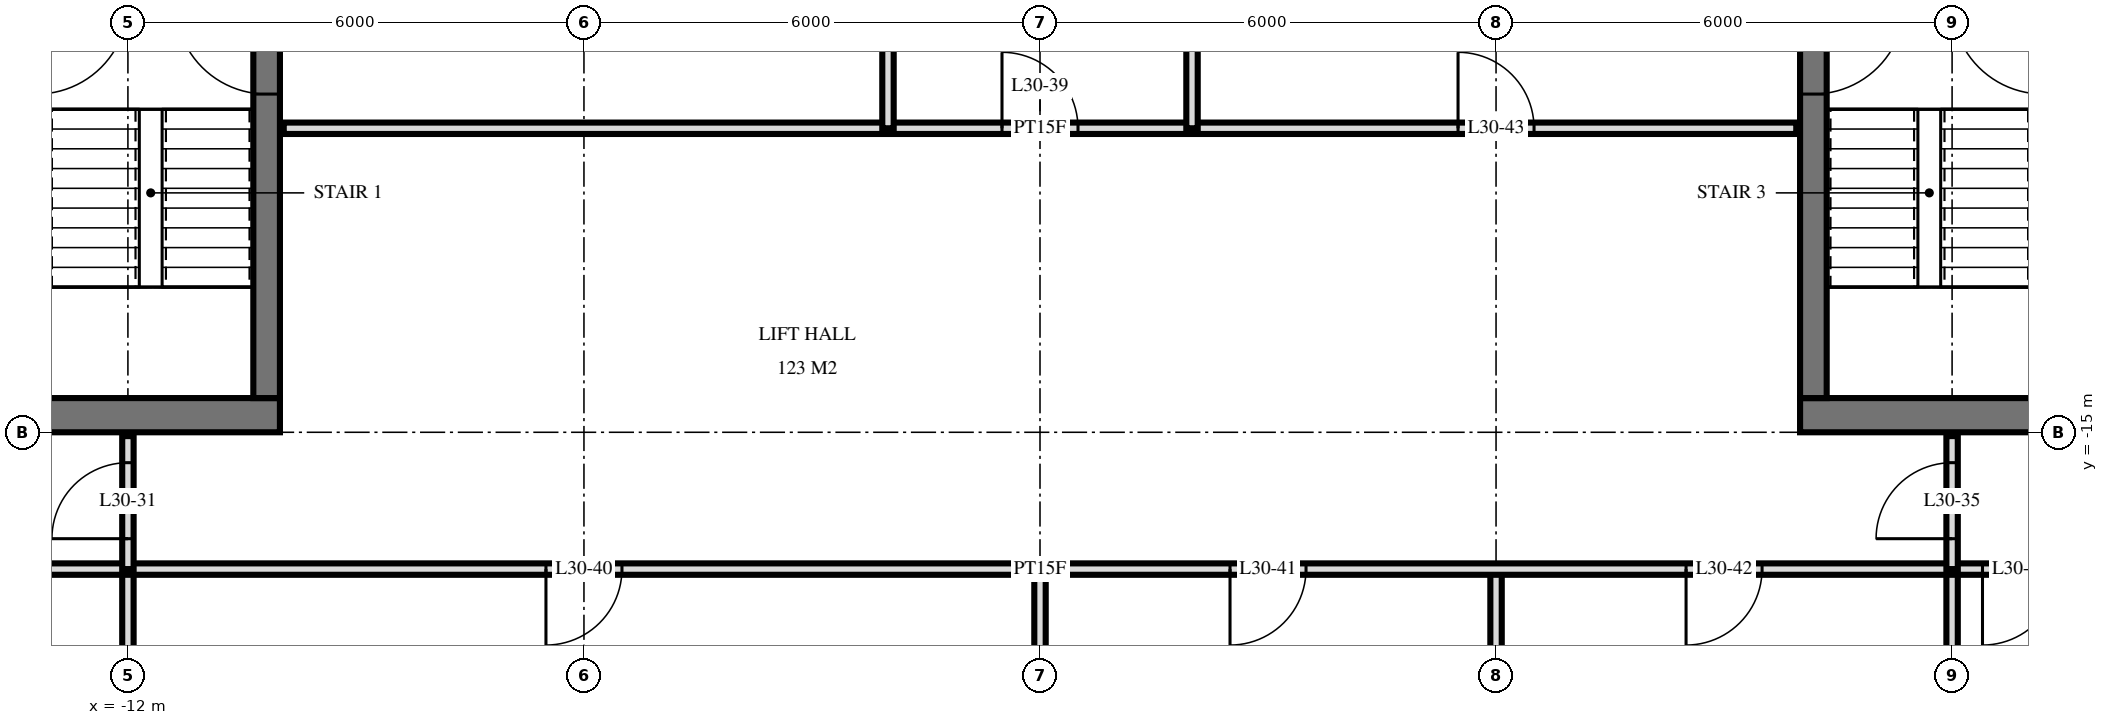
"""IFC4 building model, lengths in metres.
Left out: names, types, materials, properties, quantities, classifications, styles, units other than length and angle.
Written with IfcOpenShell. Run it as: python <this file> out.ifc"""

import sys

from ifc_helpers import new_model, si_unit, direction, frame, frame_2d, origin, place, context, subcontext, project, spatial, rectangle, extrude, element, fill, save


model = new_model("IFC4")
c1 = context("Model", 3, precision=1e-05, world=origin(), true_north=direction((0.0, 1.0)))
c2 = subcontext(c1, "Body", "Model", "MODEL_VIEW")
j1 = project(units=[si_unit("LENGTHUNIT", "METRE"), si_unit("PLANEANGLEUNIT", "RADIAN")], contexts=[c1])
p1 = place(None, origin())
s1 = spatial("IfcSite", under=j1, at=p1, CompositionType="ELEMENT")
p2 = place(p1, origin())
s2 = spatial("IfcBuilding", under=s1, at=p2, CompositionType="ELEMENT")
p3 = place(p2, frame((0.0, 0.0, 120.0)))
s3 = spatial("IfcBuildingStorey", under=s2, at=p3, CompositionType="ELEMENT", Elevation=120.0)
p4 = place(p3, frame((-24.5, -14.775, 0.0), z_axis=(0.0, 0.0, 1.0), x_axis=(1.0, 0.0, 0.0)))
e1 = element("IfcWall", 1, at=p4, inside=s3, PredefinedType="SHEAR", context=c2, shape_type="SweptSolid", body=[
    extrude(rectangle(XDim=14.5, YDim=0.45, at=frame_2d((7.25, 0.0))), origin(), (0.0, 0.0, 1.0), 3.6),
])
p5 = place(p4, frame((6.2, 0.0, 0.0)))
e2 = element("IfcOpeningElement", 2, at=p5, cuts=e1, PredefinedType="OPENING", context=c2, shape_type="SweptSolid", body=[
    extrude(rectangle(XDim=1.2, YDim=2.1, at=frame_2d((0.6, 1.05))), frame((0.0, 0.235, 0.0), z_axis=(0.0, -1.0, 0.0), x_axis=(1.0, 0.0, 0.0)), (0.0, 0.0, 1.0), 0.47),
])
p6 = place(p4, frame((9.25, 0.0, 0.0)))
e3 = element("IfcOpeningElement", 3, at=p6, cuts=e1, PredefinedType="OPENING", context=c2, shape_type="SweptSolid", body=[
    extrude(rectangle(XDim=1.1, YDim=2.1, at=frame_2d((0.55, 1.05))), frame((0.0, 0.235, 0.0), z_axis=(0.0, -1.0, 0.0), x_axis=(1.0, 0.0, 0.0)), (0.0, 0.0, 1.0), 0.47),
])
p7 = place(p4, frame((3.5, 0.0, 0.0)))
e4 = element("IfcOpeningElement", 4, at=p7, cuts=e1, PredefinedType="OPENING", context=c2, shape_type="SweptSolid", body=[
    extrude(rectangle(XDim=0.9, YDim=2.1, at=frame_2d((0.45, 1.05))), frame((0.0, 0.235, 0.0), z_axis=(0.0, -1.0, 0.0), x_axis=(1.0, 0.0, 0.0)), (0.0, 0.0, 1.0), 0.47),
])
p8 = place(p4, frame((1.05, 0.0, 0.0)))
e5 = element("IfcOpeningElement", 5, at=p8, cuts=e1, PredefinedType="OPENING", context=c2, shape_type="SweptSolid", body=[
    extrude(rectangle(XDim=1.0, YDim=2.1, at=frame_2d((0.5, 1.05))), frame((0.0, 0.235, 0.0), z_axis=(0.0, -1.0, 0.0), x_axis=(1.0, 0.0, 0.0)), (0.0, 0.0, 1.0), 0.47),
])
p9 = place(p3, frame((-10.175, -14.55, 0.0), z_axis=(0.0, 0.0, 1.0), x_axis=(0.0, 1.0, 0.0)))
e6 = element("IfcWall", 6, at=p9, inside=s3, PredefinedType="SHEAR", context=c2, shape_type="SweptSolid", body=[
    extrude(rectangle(XDim=14.1, YDim=0.35, at=frame_2d((7.05, 0.0))), origin(), (0.0, 0.0, 1.0), 3.6),
])
p10 = place(p9, frame((8.4, 0.0, 0.0)))
e7 = element("IfcOpeningElement", 7, at=p10, cuts=e6, PredefinedType="OPENING", context=c2, shape_type="SweptSolid", body=[
    extrude(rectangle(XDim=1.4, YDim=2.4, at=frame_2d((0.7, 1.2))), frame((0.0, 0.185, 0.0), z_axis=(0.0, -1.0, 0.0), x_axis=(1.0, 0.0, 0.0)), (0.0, 0.0, 1.0), 0.37),
])
p11 = place(p9, frame((10.0, 0.0, 0.0)))
e8 = element("IfcOpeningElement", 8, at=p11, cuts=e6, PredefinedType="OPENING", context=c2, shape_type="SweptSolid", body=[
    extrude(rectangle(XDim=1.4, YDim=2.4, at=frame_2d((0.7, 1.2))), frame((0.0, 0.185, 0.0), z_axis=(0.0, -1.0, 0.0), x_axis=(1.0, 0.0, 0.0)), (0.0, 0.0, 1.0), 0.37),
])
p12 = place(p9, frame((4.0, 0.0, 0.0)))
e9 = element("IfcOpeningElement", 9, at=p12, cuts=e6, PredefinedType="OPENING", context=c2, shape_type="SweptSolid", body=[
    extrude(rectangle(XDim=1.2, YDim=2.1, at=frame_2d((0.6, 1.05))), frame((0.0, 0.185, 0.0), z_axis=(0.0, -1.0, 0.0), x_axis=(1.0, 0.0, 0.0)), (0.0, 0.0, 1.0), 0.37),
])
p13 = place(p3, frame((10.0, -14.775, 0.0), z_axis=(0.0, 0.0, 1.0), x_axis=(1.0, 0.0, 0.0)))
e10 = element("IfcWall", 10, at=p13, inside=s3, PredefinedType="SHEAR", context=c2, shape_type="SweptSolid", body=[
    extrude(rectangle(XDim=14.5, YDim=0.45, at=frame_2d((7.25, 0.0))), origin(), (0.0, 0.0, 1.0), 3.6),
])
p14 = place(p13, frame((7.1, 0.0, 0.0)))
e11 = element("IfcOpeningElement", 11, at=p14, cuts=e10, PredefinedType="OPENING", context=c2, shape_type="SweptSolid", body=[
    extrude(rectangle(XDim=1.2, YDim=2.1, at=frame_2d((0.6, 1.05))), frame((0.0, 0.235, 0.0), z_axis=(0.0, -1.0, 0.0), x_axis=(1.0, 0.0, 0.0)), (0.0, 0.0, 1.0), 0.47),
])
p15 = place(p13, frame((4.15, 0.0, 0.0)))
e12 = element("IfcOpeningElement", 12, at=p15, cuts=e10, PredefinedType="OPENING", context=c2, shape_type="SweptSolid", body=[
    extrude(rectangle(XDim=1.1, YDim=2.1, at=frame_2d((0.55, 1.05))), frame((0.0, 0.235, 0.0), z_axis=(0.0, -1.0, 0.0), x_axis=(1.0, 0.0, 0.0)), (0.0, 0.0, 1.0), 0.47),
])
p16 = place(p13, frame((10.1, 0.0, 0.0)))
e13 = element("IfcOpeningElement", 13, at=p16, cuts=e10, PredefinedType="OPENING", context=c2, shape_type="SweptSolid", body=[
    extrude(rectangle(XDim=0.9, YDim=2.1, at=frame_2d((0.45, 1.05))), frame((0.0, 0.235, 0.0), z_axis=(0.0, -1.0, 0.0), x_axis=(1.0, 0.0, 0.0)), (0.0, 0.0, 1.0), 0.47),
])
p17 = place(p13, frame((12.45, 0.0, 0.0)))
e14 = element("IfcOpeningElement", 14, at=p17, cuts=e10, PredefinedType="OPENING", context=c2, shape_type="SweptSolid", body=[
    extrude(rectangle(XDim=1.0, YDim=2.1, at=frame_2d((0.5, 1.05))), frame((0.0, 0.235, 0.0), z_axis=(0.0, -1.0, 0.0), x_axis=(1.0, 0.0, 0.0)), (0.0, 0.0, 1.0), 0.47),
])
p18 = place(p3, frame((10.175, -14.55, 0.0), z_axis=(0.0, 0.0, 1.0), x_axis=(0.0, 1.0, 0.0)))
e15 = element("IfcWall", 15, at=p18, inside=s3, PredefinedType="SHEAR", context=c2, shape_type="SweptSolid", body=[
    extrude(rectangle(XDim=14.1, YDim=0.35, at=frame_2d((7.05, 0.0))), origin(), (0.0, 0.0, 1.0), 3.6),
])
p19 = place(p18, frame((8.4, 0.0, 0.0)))
e16 = element("IfcOpeningElement", 16, at=p19, cuts=e15, PredefinedType="OPENING", context=c2, shape_type="SweptSolid", body=[
    extrude(rectangle(XDim=1.4, YDim=2.4, at=frame_2d((0.7, 1.2))), frame((0.0, 0.185, 0.0), z_axis=(0.0, -1.0, 0.0), x_axis=(1.0, 0.0, 0.0)), (0.0, 0.0, 1.0), 0.37),
])
p20 = place(p18, frame((10.0, 0.0, 0.0)))
e17 = element("IfcOpeningElement", 17, at=p20, cuts=e15, PredefinedType="OPENING", context=c2, shape_type="SweptSolid", body=[
    extrude(rectangle(XDim=1.4, YDim=2.4, at=frame_2d((0.7, 1.2))), frame((0.0, 0.185, 0.0), z_axis=(0.0, -1.0, 0.0), x_axis=(1.0, 0.0, 0.0)), (0.0, 0.0, 1.0), 0.37),
])
p21 = place(p18, frame((4.0, 0.0, 0.0)))
e18 = element("IfcOpeningElement", 18, at=p21, cuts=e15, PredefinedType="OPENING", context=c2, shape_type="SweptSolid", body=[
    extrude(rectangle(XDim=1.2, YDim=2.1, at=frame_2d((0.6, 1.05))), frame((0.0, 0.185, 0.0), z_axis=(0.0, -1.0, 0.0), x_axis=(1.0, 0.0, 0.0)), (0.0, 0.0, 1.0), 0.37),
])
p22 = place(p3, frame((12.0, -16.8, 0.0), z_axis=(0.0, 0.0, 1.0), x_axis=(0.0, 1.0, 0.0)))
e19 = element("IfcWall", 19, at=p22, inside=s3, PredefinedType="PARTITIONING", context=c2, shape_type="SweptSolid", body=[
    extrude(rectangle(XDim=1.75, YDim=0.15, at=frame_2d((0.875, 0.0))), origin(), (0.0, 0.0, 1.0), 3.32),
])
p23 = place(p22, frame((0.4, 0.0, 0.0)))
e20 = element("IfcOpeningElement", 20, at=p23, cuts=e19, PredefinedType="OPENING", context=c2, shape_type="SweptSolid", body=[
    extrude(rectangle(XDim=1.0, YDim=2.1, at=frame_2d((0.5, 1.05))), frame((0.0, 0.085, 0.0), z_axis=(0.0, -1.0, 0.0), x_axis=(1.0, 0.0, 0.0)), (0.0, 0.0, 1.0), 0.17),
])
for number, where, z_axis, x_axis in (
    (21, (12.0, -33.62, 0.0), (0.0, 0.0, 1.0), (0.0, 1.0, 0.0)),
    (22, (6.0, -33.62, 0.0), (0.0, 0.0, 1.0), (0.0, 1.0, 0.0)),
):
    element("IfcWall", number, at=place(p3, frame(where, z_axis=z_axis, x_axis=x_axis)), inside=s3, PredefinedType="PARTITIONING", context=c2, shape_type="SweptSolid", body=[
        extrude(rectangle(XDim=16.82, YDim=0.15, at=frame_2d((8.41, 0.0))), origin(), (0.0, 0.0, 1.0), 3.32),
    ])
p24 = place(p3, frame((2.0, -11.0, 0.0), z_axis=(0.0, 0.0, 1.0), x_axis=(0.0, 1.0, 0.0)))
e23 = element("IfcWall", 23, at=p24, inside=s3, PredefinedType="PARTITIONING", context=c2, shape_type="SweptSolid", body=[
    extrude(rectangle(XDim=4.0, YDim=0.15, at=frame_2d((2.0, 0.0))), origin(), (0.0, 0.0, 1.0), 3.32),
])
p25 = place(p3, frame((0.0, -33.62, 0.0), z_axis=(0.0, 0.0, 1.0), x_axis=(0.0, 1.0, 0.0)))
e24 = element("IfcWall", 24, at=p25, inside=s3, PredefinedType="PARTITIONING", context=c2, shape_type="SweptSolid", body=[
    extrude(rectangle(XDim=16.82, YDim=0.15, at=frame_2d((8.41, 0.0))), origin(), (0.0, 0.0, 1.0), 3.32),
])
p26 = place(p3, frame((-2.0, -11.0, 0.0), z_axis=(0.0, 0.0, 1.0), x_axis=(0.0, 1.0, 0.0)))
e25 = element("IfcWall", 25, at=p26, inside=s3, PredefinedType="PARTITIONING", context=c2, shape_type="SweptSolid", body=[
    extrude(rectangle(XDim=4.0, YDim=0.15, at=frame_2d((2.0, 0.0))), origin(), (0.0, 0.0, 1.0), 3.32),
])
p27 = place(p3, frame((-12.0, -16.8, 0.0), z_axis=(0.0, 0.0, 1.0), x_axis=(0.0, 1.0, 0.0)))
e26 = element("IfcWall", 26, at=p27, inside=s3, PredefinedType="PARTITIONING", context=c2, shape_type="SweptSolid", body=[
    extrude(rectangle(XDim=1.75, YDim=0.15, at=frame_2d((0.875, 0.0))), origin(), (0.0, 0.0, 1.0), 3.32),
])
p28 = place(p27, frame((0.4, 0.0, 0.0)))
e27 = element("IfcOpeningElement", 27, at=p28, cuts=e26, PredefinedType="OPENING", context=c2, shape_type="SweptSolid", body=[
    extrude(rectangle(XDim=1.0, YDim=2.1, at=frame_2d((0.5, 1.05))), frame((0.0, 0.085, 0.0), z_axis=(0.0, -1.0, 0.0), x_axis=(1.0, 0.0, 0.0)), (0.0, 0.0, 1.0), 0.17),
])
p29 = place(p3, frame((-12.0, -33.62, 0.0), z_axis=(0.0, 0.0, 1.0), x_axis=(0.0, 1.0, 0.0)))
e28 = element("IfcWall", 28, at=p29, inside=s3, PredefinedType="PARTITIONING", context=c2, shape_type="SweptSolid", body=[
    extrude(rectangle(XDim=16.82, YDim=0.15, at=frame_2d((8.41, 0.0))), origin(), (0.0, 0.0, 1.0), 3.32),
])
p30 = place(p3, frame((-28.02, -16.8, 0.0), z_axis=(0.0, 0.0, 1.0), x_axis=(1.0, 0.0, 0.0)))
e29 = element("IfcWall", 29, at=p30, inside=s3, PredefinedType="PARTITIONING", context=c2, shape_type="SweptSolid", body=[
    extrude(rectangle(XDim=56.04, YDim=0.15, at=frame_2d((28.02, 0.0))), origin(), (0.0, 0.0, 1.0), 3.32),
])
p31 = place(p30, frame((12.52, 0.0, 0.0)))
e30 = element("IfcOpeningElement", 30, at=p31, cuts=e29, PredefinedType="OPENING", context=c2, shape_type="SweptSolid", body=[
    extrude(rectangle(XDim=1.0, YDim=2.1, at=frame_2d((0.5, 1.05))), frame((0.0, 0.085, 0.0), z_axis=(0.0, -1.0, 0.0), x_axis=(1.0, 0.0, 0.0)), (0.0, 0.0, 1.0), 0.17),
])
p32 = place(p30, frame((8.32, 0.0, 0.0)))
e31 = element("IfcOpeningElement", 31, at=p32, cuts=e29, PredefinedType="OPENING", context=c2, shape_type="SweptSolid", body=[
    extrude(rectangle(XDim=1.0, YDim=2.1, at=frame_2d((0.5, 1.05))), frame((0.0, 0.085, 0.0), z_axis=(0.0, -1.0, 0.0), x_axis=(1.0, 0.0, 0.0)), (0.0, 0.0, 1.0), 0.17),
])
p33 = place(p30, frame((40.42, 0.0, 0.0)))
e32 = element("IfcOpeningElement", 32, at=p33, cuts=e29, PredefinedType="OPENING", context=c2, shape_type="SweptSolid", body=[
    extrude(rectangle(XDim=1.0, YDim=2.1, at=frame_2d((0.5, 1.05))), frame((0.0, 0.085, 0.0), z_axis=(0.0, -1.0, 0.0), x_axis=(1.0, 0.0, 0.0)), (0.0, 0.0, 1.0), 0.17),
])
p34 = place(p30, frame((46.72, 0.0, 0.0)))
e33 = element("IfcOpeningElement", 33, at=p34, cuts=e29, PredefinedType="OPENING", context=c2, shape_type="SweptSolid", body=[
    extrude(rectangle(XDim=1.0, YDim=2.1, at=frame_2d((0.5, 1.05))), frame((0.0, 0.085, 0.0), z_axis=(0.0, -1.0, 0.0), x_axis=(1.0, 0.0, 0.0)), (0.0, 0.0, 1.0), 0.17),
])
p35 = place(p30, frame((21.52, 0.0, 0.0)))
e34 = element("IfcOpeningElement", 34, at=p35, cuts=e29, PredefinedType="OPENING", context=c2, shape_type="SweptSolid", body=[
    extrude(rectangle(XDim=1.0, YDim=2.1, at=frame_2d((0.5, 1.05))), frame((0.0, 0.085, 0.0), z_axis=(0.0, -1.0, 0.0), x_axis=(1.0, 0.0, 0.0)), (0.0, 0.0, 1.0), 0.17),
])
p36 = place(p30, frame((30.52, 0.0, 0.0)))
e35 = element("IfcOpeningElement", 35, at=p36, cuts=e29, PredefinedType="OPENING", context=c2, shape_type="SweptSolid", body=[
    extrude(rectangle(XDim=1.0, YDim=2.1, at=frame_2d((0.5, 1.05))), frame((0.0, 0.085, 0.0), z_axis=(0.0, -1.0, 0.0), x_axis=(1.0, 0.0, 0.0)), (0.0, 0.0, 1.0), 0.17),
])
p37 = place(p30, frame((36.52, 0.0, 0.0)))
e36 = element("IfcOpeningElement", 36, at=p37, cuts=e29, PredefinedType="OPENING", context=c2, shape_type="SweptSolid", body=[
    extrude(rectangle(XDim=1.0, YDim=2.1, at=frame_2d((0.5, 1.05))), frame((0.0, 0.085, 0.0), z_axis=(0.0, -1.0, 0.0), x_axis=(1.0, 0.0, 0.0)), (0.0, 0.0, 1.0), 0.17),
])
p38 = place(p3, frame((-9.95, -11.0, 0.0), z_axis=(0.0, 0.0, 1.0), x_axis=(1.0, 0.0, 0.0)))
e37 = element("IfcWall", 37, at=p38, inside=s3, PredefinedType="PARTITIONING", context=c2, shape_type="SweptSolid", body=[
    extrude(rectangle(XDim=19.9, YDim=0.15, at=frame_2d((9.95, 0.0))), origin(), (0.0, 0.0, 1.0), 3.32),
])
p39 = place(p38, frame((9.45, 0.0, 0.0)))
e38 = element("IfcOpeningElement", 38, at=p39, cuts=e37, PredefinedType="OPENING", context=c2, shape_type="SweptSolid", body=[
    extrude(rectangle(XDim=1.0, YDim=2.1, at=frame_2d((0.5, 1.05))), frame((0.0, 0.085, 0.0), z_axis=(0.0, -1.0, 0.0), x_axis=(1.0, 0.0, 0.0)), (0.0, 0.0, 1.0), 0.17),
])
p40 = place(p38, frame((15.45, 0.0, 0.0)))
e39 = element("IfcOpeningElement", 39, at=p40, cuts=e37, PredefinedType="OPENING", context=c2, shape_type="SweptSolid", body=[
    extrude(rectangle(XDim=1.0, YDim=2.1, at=frame_2d((0.5, 1.05))), frame((0.0, 0.085, 0.0), z_axis=(0.0, -1.0, 0.0), x_axis=(1.0, 0.0, 0.0)), (0.0, 0.0, 1.0), 0.17),
])
p41 = place(p12, origin())
e40 = element("IfcDoor", 40, at=p41, inside=s3, OperationType="SINGLE_SWING_LEFT", PredefinedType="DOOR", context=c2, shape_type="SweptSolid", body=[
    extrude(rectangle(XDim=1.2, YDim=2.1, at=frame_2d((0.6, 1.05))), frame((0.0, 0.025, 0.0), z_axis=(0.0, -1.0, 0.0), x_axis=(1.0, 0.0, 0.0)), (0.0, 0.0, 1.0), 0.05),
])
fill(e9, e40)
p42 = place(p21, frame((0.6, 0.0, 0.0), z_axis=(0.0, 0.0, 1.0), x_axis=(-1.0, 0.0, 0.0)))
e41 = element("IfcDoor", 41, at=p42, inside=s3, OperationType="SINGLE_SWING_RIGHT", PredefinedType="DOOR", context=c2, shape_type="SweptSolid", body=[
    extrude(rectangle(XDim=1.2, YDim=2.1, at=frame_2d((0.0, 1.05))), frame((0.0, -0.025, 0.0), z_axis=(0.0, 1.0, 0.0), x_axis=(-1.0, 0.0, 0.0)), (0.0, 0.0, 1.0), 0.05),
])
fill(e18, e41)
p43 = place(p28, origin())
e42 = element("IfcDoor", 42, at=p43, inside=s3, OperationType="SINGLE_SWING_RIGHT", PredefinedType="DOOR", context=c2, shape_type="SweptSolid", body=[
    extrude(rectangle(XDim=1.0, YDim=2.1, at=frame_2d((0.5, 1.05))), frame((0.0, 0.025, 0.0), z_axis=(0.0, -1.0, 0.0), x_axis=(1.0, 0.0, 0.0)), (0.0, 0.0, 1.0), 0.05),
])
fill(e27, e42)
p44 = place(p23, origin())
e43 = element("IfcDoor", 43, at=p44, inside=s3, OperationType="SINGLE_SWING_RIGHT", PredefinedType="DOOR", context=c2, shape_type="SweptSolid", body=[
    extrude(rectangle(XDim=1.0, YDim=2.1, at=frame_2d((0.5, 1.05))), frame((0.0, 0.025, 0.0), z_axis=(0.0, -1.0, 0.0), x_axis=(1.0, 0.0, 0.0)), (0.0, 0.0, 1.0), 0.05),
])
fill(e20, e43)
p45 = place(p33, frame((0.5, 0.0, 0.0), z_axis=(0.0, 0.0, 1.0), x_axis=(-1.0, 0.0, 0.0)))
e44 = element("IfcDoor", 44, at=p45, inside=s3, OperationType="SINGLE_SWING_LEFT", PredefinedType="DOOR", context=c2, shape_type="SweptSolid", body=[
    extrude(rectangle(XDim=1.0, YDim=2.1, at=frame_2d((0.0, 1.05))), frame((0.0, -0.025, 0.0), z_axis=(0.0, 1.0, 0.0), x_axis=(-1.0, 0.0, 0.0)), (0.0, 0.0, 1.0), 0.05),
])
fill(e32, e44)
p46 = place(p39, origin())
e45 = element("IfcDoor", 45, at=p46, inside=s3, OperationType="SINGLE_SWING_RIGHT", PredefinedType="DOOR", context=c2, shape_type="SweptSolid", body=[
    extrude(rectangle(XDim=1.0, YDim=2.1, at=frame_2d((0.5, 1.05))), frame((0.0, 0.025, 0.0), z_axis=(0.0, -1.0, 0.0), x_axis=(1.0, 0.0, 0.0)), (0.0, 0.0, 1.0), 0.05),
])
fill(e38, e45)
p47 = place(p35, frame((0.5, 0.0, 0.0), z_axis=(0.0, 0.0, 1.0), x_axis=(-1.0, 0.0, 0.0)))
e46 = element("IfcDoor", 46, at=p47, inside=s3, OperationType="SINGLE_SWING_LEFT", PredefinedType="DOOR", context=c2, shape_type="SweptSolid", body=[
    extrude(rectangle(XDim=1.0, YDim=2.1, at=frame_2d((0.0, 1.05))), frame((0.0, -0.025, 0.0), z_axis=(0.0, 1.0, 0.0), x_axis=(-1.0, 0.0, 0.0)), (0.0, 0.0, 1.0), 0.05),
])
fill(e34, e46)
p48 = place(p36, frame((0.5, 0.0, 0.0), z_axis=(0.0, 0.0, 1.0), x_axis=(-1.0, 0.0, 0.0)))
e47 = element("IfcDoor", 47, at=p48, inside=s3, OperationType="SINGLE_SWING_LEFT", PredefinedType="DOOR", context=c2, shape_type="SweptSolid", body=[
    extrude(rectangle(XDim=1.0, YDim=2.1, at=frame_2d((0.0, 1.05))), frame((0.0, -0.025, 0.0), z_axis=(0.0, 1.0, 0.0), x_axis=(-1.0, 0.0, 0.0)), (0.0, 0.0, 1.0), 0.05),
])
fill(e35, e47)
p49 = place(p37, frame((0.5, 0.0, 0.0), z_axis=(0.0, 0.0, 1.0), x_axis=(-1.0, 0.0, 0.0)))
e48 = element("IfcDoor", 48, at=p49, inside=s3, OperationType="SINGLE_SWING_LEFT", PredefinedType="DOOR", context=c2, shape_type="SweptSolid", body=[
    extrude(rectangle(XDim=1.0, YDim=2.1, at=frame_2d((0.0, 1.05))), frame((0.0, -0.025, 0.0), z_axis=(0.0, 1.0, 0.0), x_axis=(-1.0, 0.0, 0.0)), (0.0, 0.0, 1.0), 0.05),
])
fill(e36, e48)
p50 = place(p40, origin())
e49 = element("IfcDoor", 49, at=p50, inside=s3, OperationType="SINGLE_SWING_RIGHT", PredefinedType="DOOR", context=c2, shape_type="SweptSolid", body=[
    extrude(rectangle(XDim=1.0, YDim=2.1, at=frame_2d((0.5, 1.05))), frame((0.0, 0.025, 0.0), z_axis=(0.0, -1.0, 0.0), x_axis=(1.0, 0.0, 0.0)), (0.0, 0.0, 1.0), 0.05),
])
fill(e39, e49)
save(model, sys.argv[1])
